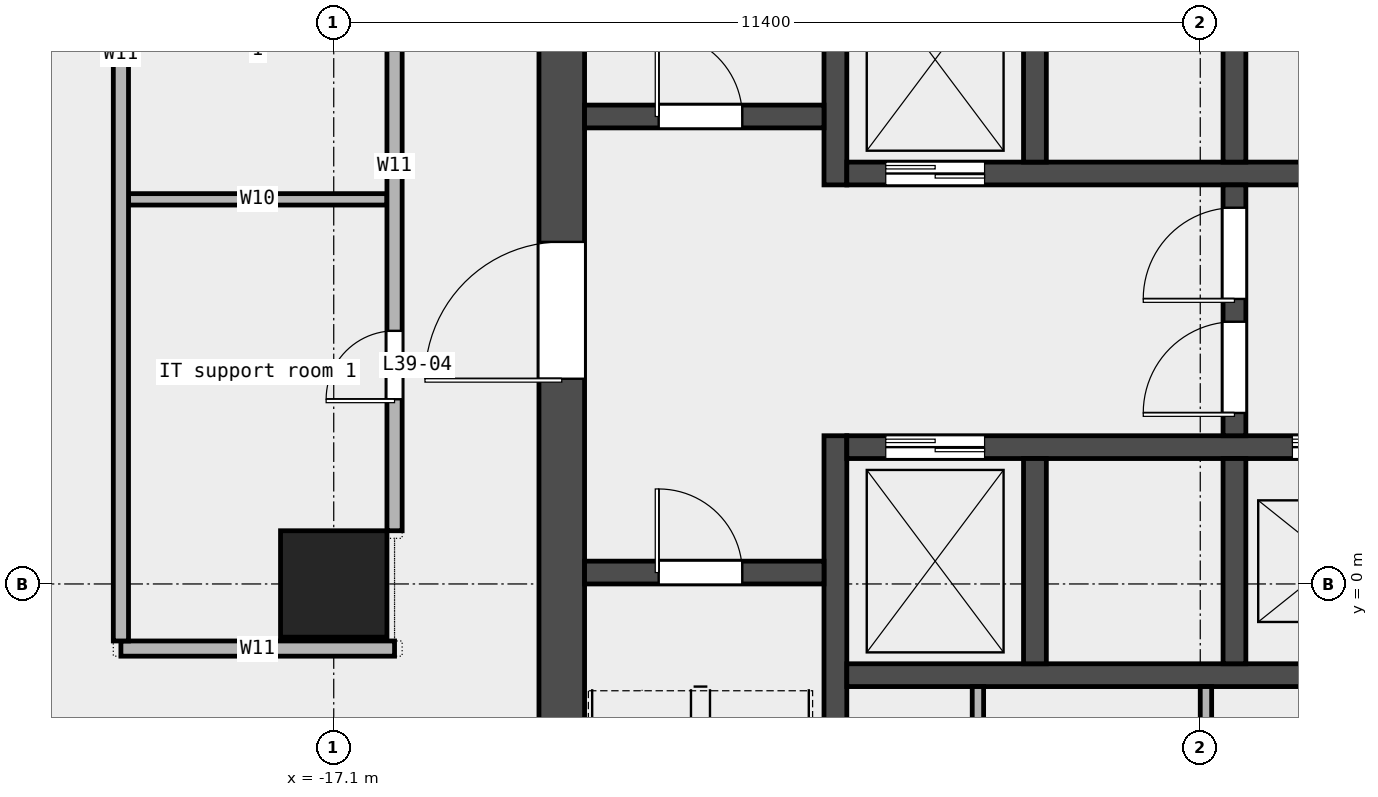
"""IFC4 building model, lengths in metres.
Left out: names, types, materials, properties, quantities, classifications, styles, units other than length and angle.
Written with IfcOpenShell. Run it as: python <this file> out.ifc"""

import sys

from ifc_helpers import new_model, si_unit, direction, frame, frame_2d, origin, origin_2d, place, context, subcontext, project, spatial, rectangle, extrude, element, fill, save


model = new_model("IFC4")
c1 = context("Model", 3, precision=1e-05, world=origin(), true_north=direction((0.0, 1.0)))
c2 = subcontext(c1, "Body", "Model", "MODEL_VIEW")
j1 = project(units=[si_unit("LENGTHUNIT", "METRE"), si_unit("PLANEANGLEUNIT", "RADIAN")], contexts=[c1])
p1 = place(None, origin())
s1 = spatial("IfcSite", under=j1, at=p1, CompositionType="ELEMENT")
p2 = place(p1, origin())
s2 = spatial("IfcBuilding", under=s1, at=p2, CompositionType="ELEMENT")
p3 = place(p2, frame((0.0, 0.0, 189.0)))
s3 = spatial("IfcBuildingStorey", under=s2, at=p3, CompositionType="ELEMENT", Elevation=189.0)
p4 = place(p3, frame((-17.1, 0.0, 0.0), z_axis=(0.0, 0.0, 1.0), x_axis=(1.0, 0.0, 0.0)))
e1 = element("IfcColumn", 1, at=p4, inside=s3, PredefinedType="COLUMN", context=c2, shape_type="SweptSolid", body=[
    extrude(rectangle(XDim=1.4, YDim=1.4, at=origin_2d()), origin(), (0.0, 0.0, 1.0), 3.6),
])
p5 = place(p3, frame((-19.9, -0.85, 0.0), z_axis=(0.0, 0.0, 1.0), x_axis=(1.0, 0.0, 0.0)))
e2 = element("IfcWall", 2, at=p5, inside=s3, PredefinedType="PARTITIONING", context=c2, shape_type="SweptSolid", body=[
    extrude(rectangle(XDim=3.6, YDim=0.2, at=frame_2d((1.8, 0.0))), origin(), (0.0, 0.0, 1.0), 3.6),
])
p6 = place(p3, frame((-19.8, 5.06, 0.0), z_axis=(0.0, 0.0, 1.0), x_axis=(1.0, 0.0, 0.0)))
e3 = element("IfcWall", 3, at=p6, inside=s3, PredefinedType="PARTITIONING", context=c2, shape_type="SweptSolid", body=[
    extrude(rectangle(XDim=3.4, YDim=0.15, at=frame_2d((1.7, 0.0))), origin(), (0.0, 0.0, 1.0), 3.6),
])
p7 = place(p3, frame((-19.9, -0.75, 0.0), z_axis=(0.0, 0.0, 1.0), x_axis=(0.0, 1.0, 0.0)))
e4 = element("IfcWall", 4, at=p7, inside=s3, PredefinedType="PARTITIONING", context=c2, shape_type="SweptSolid", body=[
    extrude(rectangle(XDim=16.05, YDim=0.2, at=frame_2d((8.025, 0.0))), origin(), (0.0, 0.0, 1.0), 3.6),
])
p8 = place(p3, frame((-16.3, 0.7, 0.0), z_axis=(0.0, 0.0, 1.0), x_axis=(0.0, 1.0, 0.0)))
e5 = element("IfcWall", 5, at=p8, inside=s3, PredefinedType="PARTITIONING", context=c2, shape_type="SweptSolid", body=[
    extrude(rectangle(XDim=9.6, YDim=0.2, at=frame_2d((4.8, 0.0))), origin(), (0.0, 0.0, 1.0), 3.6),
])
p9 = place(p8, frame((1.73, 0.0, 0.0)))
e6 = element("IfcOpeningElement", 6, at=p9, cuts=e5, PredefinedType="OPENING", context=c2, shape_type="SweptSolid", body=[
    extrude(rectangle(XDim=0.9, YDim=2.1, at=frame_2d((0.45, 1.05))), frame((0.0, 0.112, 0.0), z_axis=(0.0, -1.0, 0.0), x_axis=(1.0, 0.0, 0.0)), (0.0, 0.0, 1.0), 0.224),
])
p10 = place(p8, frame((6.353, 0.0, 0.0)))
e7 = element("IfcOpeningElement", 7, at=p10, cuts=e5, PredefinedType="OPENING", context=c2, shape_type="SweptSolid", body=[
    extrude(rectangle(XDim=0.9, YDim=2.1, at=frame_2d((0.45, 1.05))), frame((0.0, 0.112, 0.0), z_axis=(0.0, -1.0, 0.0), x_axis=(1.0, 0.0, 0.0)), (0.0, 0.0, 1.0), 0.224),
])
p11 = place(p3, frame((-14.1, -6.6, 0.0), z_axis=(0.0, 0.0, 1.0), x_axis=(0.0, 1.0, 0.0)))
e8 = element("IfcWall", 8, at=p11, inside=s3, PredefinedType="SHEAR", context=c2, shape_type="SweptSolid", body=[
    extrude(rectangle(XDim=19.5, YDim=0.6, at=frame_2d((9.75, 0.0))), origin(), (0.0, 0.0, 1.0), 3.7),
])
p12 = place(p11, frame((9.3, 0.0, 0.0)))
e9 = element("IfcOpeningElement", 9, at=p12, cuts=e8, PredefinedType="OPENING", context=c2, shape_type="SweptSolid", body=[
    extrude(rectangle(XDim=1.8, YDim=2.1, at=frame_2d((0.9, 1.05))), frame((0.0, 0.312, 0.0), z_axis=(0.0, -1.0, 0.0), x_axis=(1.0, 0.0, 0.0)), (0.0, 0.0, 1.0), 0.624),
])
p13 = place(p3, frame((-10.5, -6.6, 0.0), z_axis=(0.0, 0.0, 1.0), x_axis=(0.0, 1.0, 0.0)))
e10 = element("IfcWall", 10, at=p13, inside=s3, PredefinedType="SHEAR", context=c2, shape_type="SweptSolid", body=[
    extrude(rectangle(XDim=8.55, YDim=0.3, at=frame_2d((4.275, 0.0))), origin(), (0.0, 0.0, 1.0), 3.7),
])
p14 = place(p3, frame((-10.5, 5.25, 0.0), z_axis=(0.0, 0.0, 1.0), x_axis=(0.0, 1.0, 0.0)))
e11 = element("IfcWall", 11, at=p14, inside=s3, PredefinedType="SHEAR", context=c2, shape_type="SweptSolid", body=[
    extrude(rectangle(XDim=7.65, YDim=0.3, at=frame_2d((3.825, 0.0))), origin(), (0.0, 0.0, 1.0), 3.7),
])
p15 = place(p3, frame((-13.8, 0.15, 0.0), z_axis=(0.0, 0.0, 1.0), x_axis=(1.0, 0.0, 0.0)))
e12 = element("IfcWall", 12, at=p15, inside=s3, PredefinedType="SOLIDWALL", context=c2, shape_type="SweptSolid", body=[
    extrude(rectangle(XDim=3.15, YDim=0.3, at=frame_2d((1.575, 0.0))), origin(), (0.0, 0.0, 1.0), 3.7),
])
p16 = place(p15, frame((0.975, 0.0, 0.0)))
e13 = element("IfcOpeningElement", 13, at=p16, cuts=e12, PredefinedType="OPENING", context=c2, shape_type="SweptSolid", body=[
    extrude(rectangle(XDim=1.1, YDim=2.1, at=frame_2d((0.55, 1.05))), frame((0.0, 0.162, 0.0), z_axis=(0.0, -1.0, 0.0), x_axis=(1.0, 0.0, 0.0)), (0.0, 0.0, 1.0), 0.324),
])
p17 = place(p3, frame((-13.8, 6.15, 0.0), z_axis=(0.0, 0.0, 1.0), x_axis=(1.0, 0.0, 0.0)))
e14 = element("IfcWall", 14, at=p17, inside=s3, PredefinedType="SOLIDWALL", context=c2, shape_type="SweptSolid", body=[
    extrude(rectangle(XDim=3.15, YDim=0.3, at=frame_2d((1.575, 0.0))), origin(), (0.0, 0.0, 1.0), 3.7),
])
p18 = place(p17, frame((0.975, 0.0, 0.0)))
e15 = element("IfcOpeningElement", 15, at=p18, cuts=e14, PredefinedType="OPENING", context=c2, shape_type="SweptSolid", body=[
    extrude(rectangle(XDim=1.1, YDim=2.1, at=frame_2d((0.55, 1.05))), frame((0.0, 0.162, 0.0), z_axis=(0.0, -1.0, 0.0), x_axis=(1.0, 0.0, 0.0)), (0.0, 0.0, 1.0), 0.324),
])
p19 = place(p3, frame((-10.35, -1.2, 0.0), z_axis=(0.0, 0.0, 1.0), x_axis=(1.0, 0.0, 0.0)))
e16 = element("IfcWall", 16, at=p19, inside=s3, PredefinedType="SOLIDWALL", context=c2, shape_type="SweptSolid", body=[
    extrude(rectangle(XDim=20.7, YDim=0.3, at=frame_2d((10.35, 0.0))), origin(), (0.0, 0.0, 1.0), 3.7),
])
p20 = place(p3, frame((-10.35, 1.8, 0.0), z_axis=(0.0, 0.0, 1.0), x_axis=(1.0, 0.0, 0.0)))
e17 = element("IfcWall", 17, at=p20, inside=s3, PredefinedType="SOLIDWALL", context=c2, shape_type="SweptSolid", body=[
    extrude(rectangle(XDim=20.7, YDim=0.3, at=frame_2d((10.35, 0.0))), origin(), (0.0, 0.0, 1.0), 3.7),
])
p21 = place(p20, frame((0.512, 0.0, 0.0)))
e18 = element("IfcOpeningElement", 18, at=p21, cuts=e17, PredefinedType="OPENING", context=c2, shape_type="SweptSolid", body=[
    extrude(rectangle(XDim=1.3, YDim=2.1, at=frame_2d((0.65, 1.05))), frame((0.0, 0.162, 0.0), z_axis=(0.0, -1.0, 0.0), x_axis=(1.0, 0.0, 0.0)), (0.0, 0.0, 1.0), 0.324),
])
p22 = place(p20, frame((5.863, 0.0, 0.0)))
e19 = element("IfcOpeningElement", 19, at=p22, cuts=e17, PredefinedType="OPENING", context=c2, shape_type="SweptSolid", body=[
    extrude(rectangle(XDim=1.1, YDim=2.1, at=frame_2d((0.55, 1.05))), frame((0.0, 0.162, 0.0), z_axis=(0.0, -1.0, 0.0), x_axis=(1.0, 0.0, 0.0)), (0.0, 0.0, 1.0), 0.324),
])
p23 = place(p20, frame((8.488, 0.0, 0.0)))
e20 = element("IfcOpeningElement", 20, at=p23, cuts=e17, PredefinedType="OPENING", context=c2, shape_type="SweptSolid", body=[
    extrude(rectangle(XDim=1.1, YDim=2.1, at=frame_2d((0.55, 1.05))), frame((0.0, 0.162, 0.0), z_axis=(0.0, -1.0, 0.0), x_axis=(1.0, 0.0, 0.0)), (0.0, 0.0, 1.0), 0.324),
])
p24 = place(p20, frame((11.113, 0.0, 0.0)))
e21 = element("IfcOpeningElement", 21, at=p24, cuts=e17, PredefinedType="OPENING", context=c2, shape_type="SweptSolid", body=[
    extrude(rectangle(XDim=1.1, YDim=2.1, at=frame_2d((0.55, 1.05))), frame((0.0, 0.162, 0.0), z_axis=(0.0, -1.0, 0.0), x_axis=(1.0, 0.0, 0.0)), (0.0, 0.0, 1.0), 0.324),
])
p25 = place(p20, frame((13.738, 0.0, 0.0)))
e22 = element("IfcOpeningElement", 22, at=p25, cuts=e17, PredefinedType="OPENING", context=c2, shape_type="SweptSolid", body=[
    extrude(rectangle(XDim=1.1, YDim=2.1, at=frame_2d((0.55, 1.05))), frame((0.0, 0.162, 0.0), z_axis=(0.0, -1.0, 0.0), x_axis=(1.0, 0.0, 0.0)), (0.0, 0.0, 1.0), 0.324),
])
p26 = place(p20, frame((16.363, 0.0, 0.0)))
e23 = element("IfcOpeningElement", 23, at=p26, cuts=e17, PredefinedType="OPENING", context=c2, shape_type="SweptSolid", body=[
    extrude(rectangle(XDim=1.1, YDim=2.1, at=frame_2d((0.55, 1.05))), frame((0.0, 0.162, 0.0), z_axis=(0.0, -1.0, 0.0), x_axis=(1.0, 0.0, 0.0)), (0.0, 0.0, 1.0), 0.324),
])
p27 = place(p20, frame((18.988, 0.0, 0.0)))
e24 = element("IfcOpeningElement", 24, at=p27, cuts=e17, PredefinedType="OPENING", context=c2, shape_type="SweptSolid", body=[
    extrude(rectangle(XDim=1.1, YDim=2.1, at=frame_2d((0.55, 1.05))), frame((0.0, 0.162, 0.0), z_axis=(0.0, -1.0, 0.0), x_axis=(1.0, 0.0, 0.0)), (0.0, 0.0, 1.0), 0.324),
])
p28 = place(p3, frame((-10.35, 5.4, 0.0), z_axis=(0.0, 0.0, 1.0), x_axis=(1.0, 0.0, 0.0)))
e25 = element("IfcWall", 25, at=p28, inside=s3, PredefinedType="SOLIDWALL", context=c2, shape_type="SweptSolid", body=[
    extrude(rectangle(XDim=20.7, YDim=0.3, at=frame_2d((10.35, 0.0))), origin(), (0.0, 0.0, 1.0), 3.7),
])
p29 = place(p28, frame((0.512, 0.0, 0.0)))
e26 = element("IfcOpeningElement", 26, at=p29, cuts=e25, PredefinedType="OPENING", context=c2, shape_type="SweptSolid", body=[
    extrude(rectangle(XDim=1.3, YDim=2.1, at=frame_2d((0.65, 1.05))), frame((0.0, 0.162, 0.0), z_axis=(0.0, -1.0, 0.0), x_axis=(1.0, 0.0, 0.0)), (0.0, 0.0, 1.0), 0.324),
])
for number, where, z_axis, x_axis in (
    (27, (-7.875, -1.05, 0.0), (0.0, 0.0, 1.0), (0.0, 1.0, 0.0)),
    (28, (-5.25, -1.05, 0.0), (0.0, 0.0, 1.0), (0.0, 1.0, 0.0)),
    (29, (-7.875, 5.55, 0.0), (0.0, 0.0, 1.0), (0.0, 1.0, 0.0)),
    (30, (-5.25, 5.55, 0.0), (0.0, 0.0, 1.0), (0.0, 1.0, 0.0)),
):
    element("IfcWall", number, at=place(p3, frame(where, z_axis=z_axis, x_axis=x_axis)), inside=s3, PredefinedType="SOLIDWALL", context=c2, shape_type="SweptSolid", body=[
        extrude(rectangle(XDim=2.7, YDim=0.3, at=frame_2d((1.35, 0.0))), origin(), (0.0, 0.0, 1.0), 3.7),
    ])
p30 = place(p3, frame((-5.25, 1.95, 0.0), z_axis=(0.0, 0.0, 1.0), x_axis=(0.0, 1.0, 0.0)))
e31 = element("IfcWall", 31, at=p30, inside=s3, PredefinedType="SOLIDWALL", context=c2, shape_type="SweptSolid", body=[
    extrude(rectangle(XDim=3.3, YDim=0.3, at=frame_2d((1.65, 0.0))), origin(), (0.0, 0.0, 1.0), 3.7),
])
p31 = place(p30, frame((0.3, 0.0, 0.0)))
e32 = element("IfcOpeningElement", 32, at=p31, cuts=e31, PredefinedType="OPENING", context=c2, shape_type="SweptSolid", body=[
    extrude(rectangle(XDim=1.2, YDim=2.1, at=frame_2d((0.6, 1.05))), frame((0.0, 0.162, 0.0), z_axis=(0.0, -1.0, 0.0), x_axis=(1.0, 0.0, 0.0)), (0.0, 0.0, 1.0), 0.324),
])
p32 = place(p30, frame((1.8, 0.0, 0.0)))
e33 = element("IfcOpeningElement", 33, at=p32, cuts=e31, PredefinedType="OPENING", context=c2, shape_type="SweptSolid", body=[
    extrude(rectangle(XDim=1.2, YDim=2.1, at=frame_2d((0.6, 1.05))), frame((0.0, 0.162, 0.0), z_axis=(0.0, -1.0, 0.0), x_axis=(1.0, 0.0, 0.0)), (0.0, 0.0, 1.0), 0.324),
])
p33 = place(p3, frame((-8.625, -6.6, 0.0), z_axis=(0.0, 0.0, 1.0), x_axis=(0.0, 1.0, 0.0)))
e34 = element("IfcWall", 34, at=p33, inside=s3, PredefinedType="PARTITIONING", context=c2, shape_type="SweptSolid", body=[
    extrude(rectangle(XDim=5.25, YDim=0.15, at=frame_2d((2.625, 0.0))), origin(), (0.0, 0.0, 1.0), 3.7),
])
p34 = place(p3, frame((-5.625, -4.425, 0.0), z_axis=(0.0, 0.0, 1.0), x_axis=(0.0, 1.0, 0.0)))
e35 = element("IfcWall", 35, at=p34, inside=s3, PredefinedType="PARTITIONING", context=c2, shape_type="SweptSolid", body=[
    extrude(rectangle(XDim=3.075, YDim=0.15, at=frame_2d((1.538, 0.0))), origin(), (0.0, 0.0, 1.0), 3.7),
])
p35 = place(p9, origin())
e36 = element("IfcDoor", 36, at=p35, inside=s3, OperationType="SINGLE_SWING_LEFT", PredefinedType="DOOR", context=c2, shape_type="SweptSolid", body=[
    extrude(rectangle(XDim=0.9, YDim=2.1, at=frame_2d((0.45, 1.05))), frame((0.0, 0.025, 0.0), z_axis=(0.0, -1.0, 0.0), x_axis=(1.0, 0.0, 0.0)), (0.0, 0.0, 1.0), 0.05),
])
fill(e6, e36)
p36 = place(p16, origin())
e37 = element("IfcDoor", 37, at=p36, inside=s3, OperationType="SINGLE_SWING_LEFT", PredefinedType="DOOR", context=c2, shape_type="SweptSolid", body=[
    extrude(rectangle(XDim=1.1, YDim=2.1, at=frame_2d((0.55, 1.05))), frame((0.0, 0.025, 0.0), z_axis=(0.0, -1.0, 0.0), x_axis=(1.0, 0.0, 0.0)), (0.0, 0.0, 1.0), 0.05),
])
fill(e13, e37)
p37 = place(p18, origin())
e38 = element("IfcDoor", 38, at=p37, inside=s3, OperationType="SINGLE_SWING_LEFT", PredefinedType="DOOR", context=c2, shape_type="SweptSolid", body=[
    extrude(rectangle(XDim=1.1, YDim=2.1, at=frame_2d((0.55, 1.05))), frame((0.0, 0.025, 0.0), z_axis=(0.0, -1.0, 0.0), x_axis=(1.0, 0.0, 0.0)), (0.0, 0.0, 1.0), 0.05),
])
fill(e15, e38)
p38 = place(p12, origin())
e39 = element("IfcDoor", 39, at=p38, inside=s3, OperationType="DOUBLE_DOOR_SINGLE_SWING", PredefinedType="DOOR", context=c2, shape_type="SweptSolid", body=[
    extrude(rectangle(XDim=1.8, YDim=2.1, at=frame_2d((0.9, 1.05))), frame((0.0, 0.025, 0.0), z_axis=(0.0, -1.0, 0.0), x_axis=(1.0, 0.0, 0.0)), (0.0, 0.0, 1.0), 0.05),
])
fill(e9, e39)
p39 = place(p31, origin())
e40 = element("IfcDoor", 40, at=p39, inside=s3, OperationType="SINGLE_SWING_LEFT", PredefinedType="DOOR", context=c2, shape_type="SweptSolid", body=[
    extrude(rectangle(XDim=1.2, YDim=2.1, at=frame_2d((0.6, 1.05))), frame((0.0, 0.025, 0.0), z_axis=(0.0, -1.0, 0.0), x_axis=(1.0, 0.0, 0.0)), (0.0, 0.0, 1.0), 0.05),
])
fill(e32, e40)
p40 = place(p32, origin())
e41 = element("IfcDoor", 41, at=p40, inside=s3, OperationType="SINGLE_SWING_RIGHT", PredefinedType="DOOR", context=c2, shape_type="SweptSolid", body=[
    extrude(rectangle(XDim=1.2, YDim=2.1, at=frame_2d((0.6, 1.05))), frame((0.0, 0.025, 0.0), z_axis=(0.0, -1.0, 0.0), x_axis=(1.0, 0.0, 0.0)), (0.0, 0.0, 1.0), 0.05),
])
fill(e33, e41)
p41 = place(p21, origin())
e42 = element("IfcDoor", 42, at=p41, inside=s3, OperationType="DOUBLE_DOOR_SLIDING", PredefinedType="DOOR", context=c2, shape_type="SweptSolid", body=[
    extrude(rectangle(XDim=1.3, YDim=2.1, at=frame_2d((0.65, 1.05))), frame((0.0, 0.025, 0.0), z_axis=(0.0, -1.0, 0.0), x_axis=(1.0, 0.0, 0.0)), (0.0, 0.0, 1.0), 0.05),
])
fill(e18, e42)
p42 = place(p22, origin())
e43 = element("IfcDoor", 43, at=p42, inside=s3, OperationType="DOUBLE_DOOR_SLIDING", PredefinedType="DOOR", context=c2, shape_type="SweptSolid", body=[
    extrude(rectangle(XDim=1.1, YDim=2.1, at=frame_2d((0.55, 1.05))), frame((0.0, 0.025, 0.0), z_axis=(0.0, -1.0, 0.0), x_axis=(1.0, 0.0, 0.0)), (0.0, 0.0, 1.0), 0.05),
])
fill(e19, e43)
p43 = place(p29, origin())
e44 = element("IfcDoor", 44, at=p43, inside=s3, OperationType="DOUBLE_DOOR_SLIDING", PredefinedType="DOOR", context=c2, shape_type="SweptSolid", body=[
    extrude(rectangle(XDim=1.3, YDim=2.1, at=frame_2d((0.65, 1.05))), frame((0.0, 0.025, 0.0), z_axis=(0.0, -1.0, 0.0), x_axis=(1.0, 0.0, 0.0)), (0.0, 0.0, 1.0), 0.05),
])
fill(e26, e44)
save(model, sys.argv[1])
